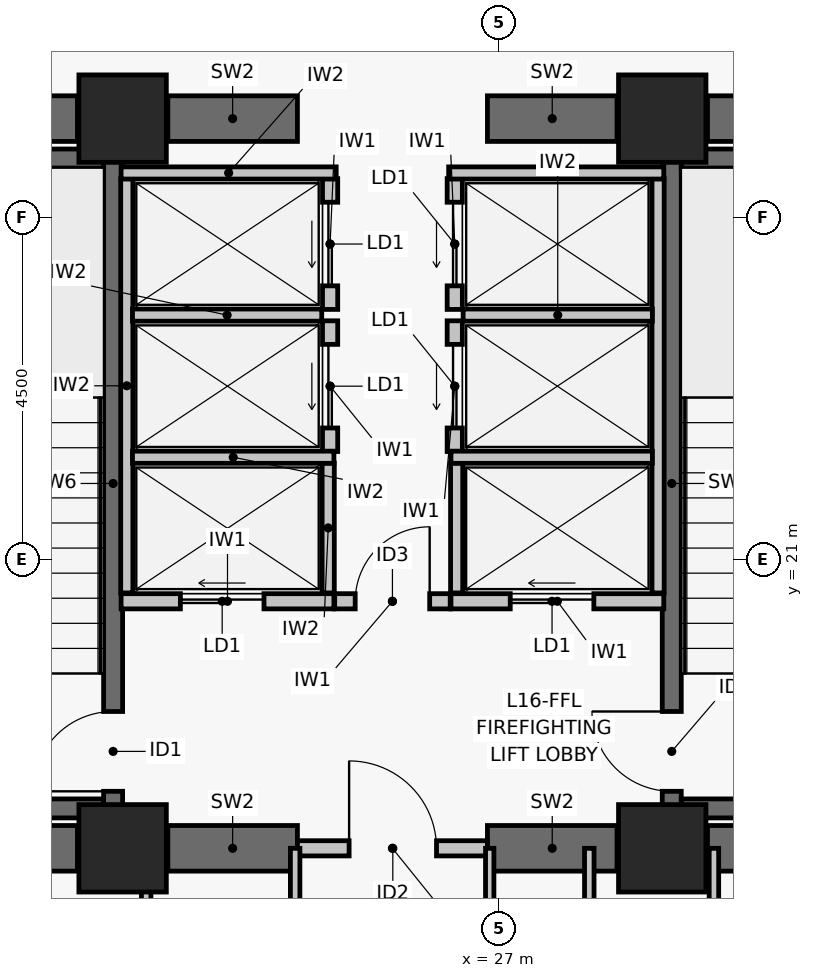
"""IFC4 building model, lengths in metres.
Left out: names, types, materials, properties, quantities, classifications, styles, units other than length and angle.
Written with IfcOpenShell. Run it as: python <this file> out.ifc"""

import sys

from ifc_helpers import new_model, si_unit, direction, frame, frame_2d, origin, origin_2d, place, context, subcontext, project, spatial, rectangle, extrude, element, fill, save


model = new_model("IFC4")
c1 = context("Model", 3, precision=1e-05, world=origin(), true_north=direction((0.0, 1.0)))
c2 = subcontext(c1, "Body", "Model", "MODEL_VIEW")
j1 = project(units=[si_unit("LENGTHUNIT", "METRE"), si_unit("PLANEANGLEUNIT", "RADIAN")], contexts=[c1])
p1 = place(None, origin())
s1 = spatial("IfcSite", under=j1, at=p1, CompositionType="ELEMENT")
p2 = place(p1, origin())
s2 = spatial("IfcBuilding", under=s1, at=p2, CompositionType="ELEMENT")
p3 = place(p2, frame((0.0, 0.0, 68.52)))
s3 = spatial("IfcBuildingStorey", under=s2, at=p3, CompositionType="ELEMENT", Elevation=68.52)
for number, where, z_axis, x_axis in (
    (1, (22.05, 17.2, 0.0), (0.0, 0.0, 1.0), (1.0, 0.0, 0.0)),
    (2, (29.15, 17.2, 0.0), (0.0, 0.0, 1.0), (1.0, 0.0, 0.0)),
    (3, (22.05, 26.8, 0.0), (0.0, 0.0, 1.0), (1.0, 0.0, 0.0)),
    (4, (29.15, 26.8, 0.0), (0.0, 0.0, 1.0), (1.0, 0.0, 0.0)),
):
    element("IfcColumn", number, at=place(p3, frame(where, z_axis=z_axis, x_axis=x_axis)), inside=s3, PredefinedType="COLUMN", context=c2, shape_type="SweptSolid", body=[
        extrude(rectangle(XDim=1.15, YDim=1.15, at=origin_2d()), origin(), (0.0, 0.0, 1.0), 3.72),
    ])
p4 = place(p3, frame((18.395, 17.2, 0.0), z_axis=(0.0, 0.0, 1.0), x_axis=(1.0, 0.0, 0.0)))
e5 = element("IfcWall", 5, at=p4, inside=s3, PredefinedType="SHEAR", context=c2, shape_type="SweptSolid", body=[
    extrude(rectangle(XDim=3.06, YDim=0.6, at=frame_2d((1.53, 0.0))), origin(), (0.0, 0.0, 1.0), 3.47),
])
p5 = place(p3, frame((22.645, 17.2, 0.0), z_axis=(0.0, 0.0, 1.0), x_axis=(1.0, 0.0, 0.0)))
e6 = element("IfcWall", 6, at=p5, inside=s3, PredefinedType="SHEAR", context=c2, shape_type="SweptSolid", body=[
    extrude(rectangle(XDim=1.705, YDim=0.6, at=frame_2d((0.853, 0.0))), origin(), (0.0, 0.0, 1.0), 3.47),
])
p6 = place(p3, frame((26.85, 17.2, 0.0), z_axis=(0.0, 0.0, 1.0), x_axis=(1.0, 0.0, 0.0)))
e7 = element("IfcWall", 7, at=p6, inside=s3, PredefinedType="SHEAR", context=c2, shape_type="SweptSolid", body=[
    extrude(rectangle(XDim=1.705, YDim=0.6, at=frame_2d((0.853, 0.0))), origin(), (0.0, 0.0, 1.0), 3.47),
])
p7 = place(p3, frame((29.745, 17.2, 0.0), z_axis=(0.0, 0.0, 1.0), x_axis=(1.0, 0.0, 0.0)))
e8 = element("IfcWall", 8, at=p7, inside=s3, PredefinedType="SHEAR", context=c2, shape_type="SweptSolid", body=[
    extrude(rectangle(XDim=3.06, YDim=0.6, at=frame_2d((1.53, 0.0))), origin(), (0.0, 0.0, 1.0), 3.47),
])
p8 = place(p3, frame((18.395, 26.8, 0.0), z_axis=(0.0, 0.0, 1.0), x_axis=(1.0, 0.0, 0.0)))
e9 = element("IfcWall", 9, at=p8, inside=s3, PredefinedType="SHEAR", context=c2, shape_type="SweptSolid", body=[
    extrude(rectangle(XDim=3.06, YDim=0.6, at=frame_2d((1.53, 0.0))), origin(), (0.0, 0.0, 1.0), 3.47),
])
p9 = place(p3, frame((22.645, 26.8, 0.0), z_axis=(0.0, 0.0, 1.0), x_axis=(1.0, 0.0, 0.0)))
e10 = element("IfcWall", 10, at=p9, inside=s3, PredefinedType="SHEAR", context=c2, shape_type="SweptSolid", body=[
    extrude(rectangle(XDim=1.705, YDim=0.6, at=frame_2d((0.853, 0.0))), origin(), (0.0, 0.0, 1.0), 3.47),
])
p10 = place(p3, frame((26.85, 26.8, 0.0), z_axis=(0.0, 0.0, 1.0), x_axis=(1.0, 0.0, 0.0)))
e11 = element("IfcWall", 11, at=p10, inside=s3, PredefinedType="SHEAR", context=c2, shape_type="SweptSolid", body=[
    extrude(rectangle(XDim=1.705, YDim=0.6, at=frame_2d((0.853, 0.0))), origin(), (0.0, 0.0, 1.0), 3.47),
])
p11 = place(p3, frame((29.745, 26.8, 0.0), z_axis=(0.0, 0.0, 1.0), x_axis=(1.0, 0.0, 0.0)))
e12 = element("IfcWall", 12, at=p11, inside=s3, PredefinedType="SHEAR", context=c2, shape_type="SweptSolid", body=[
    extrude(rectangle(XDim=3.06, YDim=0.6, at=frame_2d((1.53, 0.0))), origin(), (0.0, 0.0, 1.0), 3.47),
])
p12 = place(p3, frame((21.925, 17.6, 0.0), z_axis=(0.0, 0.0, 1.0), x_axis=(0.0, 1.0, 0.0)))
e13 = element("IfcWall", 13, at=p12, inside=s3, PredefinedType="SHEAR", context=c2, shape_type="SweptSolid", body=[
    extrude(rectangle(XDim=8.8, YDim=0.25, at=frame_2d((4.4, 0.0))), origin(), (0.0, 0.0, 1.0), 3.47),
])
p13 = place(p12, frame((0.35, 0.0, 0.0)))
e14 = element("IfcOpeningElement", 14, at=p13, cuts=e13, PredefinedType="OPENING", context=c2, shape_type="SweptSolid", body=[
    extrude(rectangle(XDim=1.05, YDim=2.08, at=frame_2d((0.525, 1.04))), frame((0.0, 0.135, 0.0), z_axis=(0.0, -1.0, 0.0), x_axis=(1.0, 0.0, 0.0)), (0.0, 0.0, 1.0), 0.27),
])
for number, where, z_axis, x_axis in (
    (15, (18.354, 17.725, 0.0), (0.0, 0.0, 1.0), (1.0, 0.0, 0.0)),
    (16, (18.354, 26.275, 0.0), (0.0, 0.0, 1.0), (1.0, 0.0, 0.0)),
):
    element("IfcWall", number, at=place(p3, frame(where, z_axis=z_axis, x_axis=x_axis)), inside=s3, PredefinedType="SHEAR", context=c2, shape_type="SweptSolid", body=[
        extrude(rectangle(XDim=3.446, YDim=0.25, at=frame_2d((1.723, 0.0))), origin(), (0.0, 0.0, 1.0), 3.47),
    ])
p14 = place(p3, frame((29.275, 17.6, 0.0), z_axis=(0.0, 0.0, 1.0), x_axis=(0.0, 1.0, 0.0)))
e17 = element("IfcWall", 17, at=p14, inside=s3, PredefinedType="SHEAR", context=c2, shape_type="SweptSolid", body=[
    extrude(rectangle(XDim=8.8, YDim=0.25, at=frame_2d((4.4, 0.0))), origin(), (0.0, 0.0, 1.0), 3.47),
])
p15 = place(p14, frame((0.35, 0.0, 0.0)))
e18 = element("IfcOpeningElement", 18, at=p15, cuts=e17, PredefinedType="OPENING", context=c2, shape_type="SweptSolid", body=[
    extrude(rectangle(XDim=1.05, YDim=2.08, at=frame_2d((0.525, 1.04))), frame((0.0, 0.135, 0.0), z_axis=(0.0, -1.0, 0.0), x_axis=(1.0, 0.0, 0.0)), (0.0, 0.0, 1.0), 0.27),
])
for number, where, z_axis, x_axis in (
    (19, (29.4, 17.725, 0.0), (0.0, 0.0, 1.0), (1.0, 0.0, 0.0)),
    (20, (29.4, 26.275, 0.0), (0.0, 0.0, 1.0), (1.0, 0.0, 0.0)),
):
    element("IfcWall", number, at=place(p3, frame(where, z_axis=z_axis, x_axis=x_axis)), inside=s3, PredefinedType="SHEAR", context=c2, shape_type="SweptSolid", body=[
        extrude(rectangle(XDim=3.446, YDim=0.25, at=frame_2d((1.723, 0.0))), origin(), (0.0, 0.0, 1.0), 3.47),
    ])
p16 = place(p3, frame((24.35, 17.2, 0.0), z_axis=(0.0, 0.0, 1.0), x_axis=(1.0, 0.0, 0.0)))
e21 = element("IfcWall", 21, at=p16, inside=s3, PredefinedType="PARTITIONING", context=c2, shape_type="SweptSolid", body=[
    extrude(rectangle(XDim=2.5, YDim=0.2, at=frame_2d((1.25, 0.0))), origin(), (0.0, 0.0, 1.0), 2.6),
])
p17 = place(p16, frame((0.68, 0.0, 0.0)))
e22 = element("IfcOpeningElement", 22, at=p17, cuts=e21, PredefinedType="OPENING", context=c2, shape_type="SweptSolid", body=[
    extrude(rectangle(XDim=1.15, YDim=2.08, at=frame_2d((0.575, 1.04))), frame((0.0, 0.11, 0.0), z_axis=(0.0, -1.0, 0.0), x_axis=(1.0, 0.0, 0.0)), (0.0, 0.0, 1.0), 0.22),
])
p18 = place(p3, frame((24.84, 20.45, 0.0), z_axis=(0.0, 0.0, 1.0), x_axis=(1.0, 0.0, 0.0)))
e23 = element("IfcWall", 23, at=p18, inside=s3, PredefinedType="PARTITIONING", context=c2, shape_type="SweptSolid", body=[
    extrude(rectangle(XDim=1.52, YDim=0.2, at=frame_2d((0.76, 0.0))), origin(), (0.0, 0.0, 1.0), 3.47),
])
p19 = place(p18, frame((0.27, 0.0, 0.0)))
e24 = element("IfcOpeningElement", 24, at=p19, cuts=e23, PredefinedType="OPENING", context=c2, shape_type="SweptSolid", body=[
    extrude(rectangle(XDim=0.98, YDim=2.06, at=frame_2d((0.49, 1.03))), frame((0.0, 0.11, 0.0), z_axis=(0.0, -1.0, 0.0), x_axis=(1.0, 0.0, 0.0)), (0.0, 0.0, 1.0), 0.22),
])
p20 = place(p3, frame((22.03, 20.45, 0.0), z_axis=(0.0, 0.0, 1.0), x_axis=(1.0, 0.0, 0.0)))
e25 = element("IfcWall", 25, at=p20, inside=s3, PredefinedType="PARTITIONING", context=c2, shape_type="SweptSolid", body=[
    extrude(rectangle(XDim=2.8, YDim=0.2, at=frame_2d((1.4, 0.0))), origin(), (0.0, 0.0, 1.0), 3.47),
])
p21 = place(p20, frame((0.78, 0.0, 0.0)))
e26 = element("IfcOpeningElement", 26, at=p21, cuts=e25, PredefinedType="OPENING", context=c2, shape_type="SweptSolid", body=[
    extrude(rectangle(XDim=1.1, YDim=2.08, at=frame_2d((0.55, 1.04))), frame((0.0, 0.11, 0.0), z_axis=(0.0, -1.0, 0.0), x_axis=(1.0, 0.0, 0.0)), (0.0, 0.0, 1.0), 0.22),
])
p22 = place(p3, frame((26.37, 20.45, 0.0), z_axis=(0.0, 0.0, 1.0), x_axis=(1.0, 0.0, 0.0)))
e27 = element("IfcWall", 27, at=p22, inside=s3, PredefinedType="PARTITIONING", context=c2, shape_type="SweptSolid", body=[
    extrude(rectangle(XDim=2.8, YDim=0.2, at=frame_2d((1.4, 0.0))), origin(), (0.0, 0.0, 1.0), 3.47),
])
p23 = place(p22, frame((0.78, 0.0, 0.0)))
e28 = element("IfcOpeningElement", 28, at=p23, cuts=e27, PredefinedType="OPENING", context=c2, shape_type="SweptSolid", body=[
    extrude(rectangle(XDim=1.1, YDim=2.08, at=frame_2d((0.55, 1.04))), frame((0.0, 0.11, 0.0), z_axis=(0.0, -1.0, 0.0), x_axis=(1.0, 0.0, 0.0)), (0.0, 0.0, 1.0), 0.22),
])
p24 = place(p3, frame((24.78, 22.42, 0.0), z_axis=(0.0, 0.0, 1.0), x_axis=(0.0, 1.0, 0.0)))
e29 = element("IfcWall", 29, at=p24, inside=s3, PredefinedType="PARTITIONING", context=c2, shape_type="SweptSolid", body=[
    extrude(rectangle(XDim=1.72, YDim=0.2, at=frame_2d((0.86, 0.0))), origin(), (0.0, 0.0, 1.0), 3.47),
])
p25 = place(p24, frame((0.31, 0.0, 0.0)))
e30 = element("IfcOpeningElement", 30, at=p25, cuts=e29, PredefinedType="OPENING", context=c2, shape_type="SweptSolid", body=[
    extrude(rectangle(XDim=1.1, YDim=2.08, at=frame_2d((0.55, 1.04))), frame((0.0, 0.11, 0.0), z_axis=(0.0, -1.0, 0.0), x_axis=(1.0, 0.0, 0.0)), (0.0, 0.0, 1.0), 0.22),
])
p26 = place(p3, frame((24.78, 24.29, 0.0), z_axis=(0.0, 0.0, 1.0), x_axis=(0.0, 1.0, 0.0)))
e31 = element("IfcWall", 31, at=p26, inside=s3, PredefinedType="PARTITIONING", context=c2, shape_type="SweptSolid", body=[
    extrude(rectangle(XDim=1.72, YDim=0.2, at=frame_2d((0.86, 0.0))), origin(), (0.0, 0.0, 1.0), 3.47),
])
p27 = place(p26, frame((0.31, 0.0, 0.0)))
e32 = element("IfcOpeningElement", 32, at=p27, cuts=e31, PredefinedType="OPENING", context=c2, shape_type="SweptSolid", body=[
    extrude(rectangle(XDim=1.1, YDim=2.08, at=frame_2d((0.55, 1.04))), frame((0.0, 0.11, 0.0), z_axis=(0.0, -1.0, 0.0), x_axis=(1.0, 0.0, 0.0)), (0.0, 0.0, 1.0), 0.22),
])
p28 = place(p3, frame((26.42, 22.42, 0.0), z_axis=(0.0, 0.0, 1.0), x_axis=(0.0, 1.0, 0.0)))
e33 = element("IfcWall", 33, at=p28, inside=s3, PredefinedType="PARTITIONING", context=c2, shape_type="SweptSolid", body=[
    extrude(rectangle(XDim=1.72, YDim=0.2, at=frame_2d((0.86, 0.0))), origin(), (0.0, 0.0, 1.0), 3.47),
])
p29 = place(p28, frame((0.31, 0.0, 0.0)))
e34 = element("IfcOpeningElement", 34, at=p29, cuts=e33, PredefinedType="OPENING", context=c2, shape_type="SweptSolid", body=[
    extrude(rectangle(XDim=1.1, YDim=2.08, at=frame_2d((0.55, 1.04))), frame((0.0, 0.11, 0.0), z_axis=(0.0, -1.0, 0.0), x_axis=(1.0, 0.0, 0.0)), (0.0, 0.0, 1.0), 0.22),
])
p30 = place(p3, frame((26.42, 24.29, 0.0), z_axis=(0.0, 0.0, 1.0), x_axis=(0.0, 1.0, 0.0)))
e35 = element("IfcWall", 35, at=p30, inside=s3, PredefinedType="PARTITIONING", context=c2, shape_type="SweptSolid", body=[
    extrude(rectangle(XDim=1.72, YDim=0.2, at=frame_2d((0.86, 0.0))), origin(), (0.0, 0.0, 1.0), 3.47),
])
p31 = place(p30, frame((0.31, 0.0, 0.0)))
e36 = element("IfcOpeningElement", 36, at=p31, cuts=e35, PredefinedType="OPENING", context=c2, shape_type="SweptSolid", body=[
    extrude(rectangle(XDim=1.1, YDim=2.08, at=frame_2d((0.55, 1.04))), frame((0.0, 0.11, 0.0), z_axis=(0.0, -1.0, 0.0), x_axis=(1.0, 0.0, 0.0)), (0.0, 0.0, 1.0), 0.22),
])
p32 = place(p3, frame((22.105, 20.56, 0.0), z_axis=(0.0, 0.0, 1.0), x_axis=(0.0, 1.0, 0.0)))
e37 = element("IfcWall", 37, at=p32, inside=s3, PredefinedType="PARTITIONING", context=c2, shape_type="SweptSolid", body=[
    extrude(rectangle(XDim=5.45, YDim=0.16, at=frame_2d((2.725, 0.0))), origin(), (0.0, 0.0, 1.0), 3.47),
])
p33 = place(p3, frame((24.755, 20.56, 0.0), z_axis=(0.0, 0.0, 1.0), x_axis=(0.0, 1.0, 0.0)))
e38 = element("IfcWall", 38, at=p33, inside=s3, PredefinedType="PARTITIONING", context=c2, shape_type="SweptSolid", body=[
    extrude(rectangle(XDim=1.71, YDim=0.16, at=frame_2d((0.855, 0.0))), origin(), (0.0, 0.0, 1.0), 3.47),
])
p34 = place(p3, frame((22.18, 22.345, 0.0), z_axis=(0.0, 0.0, 1.0), x_axis=(1.0, 0.0, 0.0)))
e39 = element("IfcWall", 39, at=p34, inside=s3, PredefinedType="PARTITIONING", context=c2, shape_type="SweptSolid", body=[
    extrude(rectangle(XDim=2.65, YDim=0.16, at=frame_2d((1.325, 0.0))), origin(), (0.0, 0.0, 1.0), 3.47),
])
p35 = place(p3, frame((22.18, 24.215, 0.0), z_axis=(0.0, 0.0, 1.0), x_axis=(1.0, 0.0, 0.0)))
e40 = element("IfcWall", 40, at=p35, inside=s3, PredefinedType="PARTITIONING", context=c2, shape_type="SweptSolid", body=[
    extrude(rectangle(XDim=2.49, YDim=0.16, at=frame_2d((1.245, 0.0))), origin(), (0.0, 0.0, 1.0), 3.47),
])
p36 = place(p3, frame((22.03, 26.085, 0.0), z_axis=(0.0, 0.0, 1.0), x_axis=(1.0, 0.0, 0.0)))
e41 = element("IfcWall", 41, at=p36, inside=s3, PredefinedType="PARTITIONING", context=c2, shape_type="SweptSolid", body=[
    extrude(rectangle(XDim=2.83, YDim=0.16, at=frame_2d((1.415, 0.0))), origin(), (0.0, 0.0, 1.0), 3.47),
])
p37 = place(p3, frame((29.095, 20.56, 0.0), z_axis=(0.0, 0.0, 1.0), x_axis=(0.0, 1.0, 0.0)))
e42 = element("IfcWall", 42, at=p37, inside=s3, PredefinedType="PARTITIONING", context=c2, shape_type="SweptSolid", body=[
    extrude(rectangle(XDim=5.45, YDim=0.16, at=frame_2d((2.725, 0.0))), origin(), (0.0, 0.0, 1.0), 3.47),
])
p38 = place(p3, frame((26.445, 20.56, 0.0), z_axis=(0.0, 0.0, 1.0), x_axis=(0.0, 1.0, 0.0)))
e43 = element("IfcWall", 43, at=p38, inside=s3, PredefinedType="PARTITIONING", context=c2, shape_type="SweptSolid", body=[
    extrude(rectangle(XDim=1.71, YDim=0.16, at=frame_2d((0.855, 0.0))), origin(), (0.0, 0.0, 1.0), 3.47),
])
p39 = place(p3, frame((26.37, 22.345, 0.0), z_axis=(0.0, 0.0, 1.0), x_axis=(1.0, 0.0, 0.0)))
e44 = element("IfcWall", 44, at=p39, inside=s3, PredefinedType="PARTITIONING", context=c2, shape_type="SweptSolid", body=[
    extrude(rectangle(XDim=2.65, YDim=0.16, at=frame_2d((1.325, 0.0))), origin(), (0.0, 0.0, 1.0), 3.47),
])
p40 = place(p3, frame((26.53, 24.215, 0.0), z_axis=(0.0, 0.0, 1.0), x_axis=(1.0, 0.0, 0.0)))
e45 = element("IfcWall", 45, at=p40, inside=s3, PredefinedType="PARTITIONING", context=c2, shape_type="SweptSolid", body=[
    extrude(rectangle(XDim=2.49, YDim=0.16, at=frame_2d((1.245, 0.0))), origin(), (0.0, 0.0, 1.0), 3.47),
])
p41 = place(p3, frame((26.34, 26.085, 0.0), z_axis=(0.0, 0.0, 1.0), x_axis=(1.0, 0.0, 0.0)))
e46 = element("IfcWall", 46, at=p41, inside=s3, PredefinedType="PARTITIONING", context=c2, shape_type="SweptSolid", body=[
    extrude(rectangle(XDim=2.83, YDim=0.16, at=frame_2d((1.415, 0.0))), origin(), (0.0, 0.0, 1.0), 3.47),
])
p42 = place(p3, frame((22.36, 14.95, 0.0), z_axis=(0.0, 0.0, 1.0), x_axis=(0.0, 1.0, 0.0)))
e47 = element("IfcWall", 47, at=p42, inside=s3, PredefinedType="PARTITIONING", context=c2, shape_type="SweptSolid", body=[
    extrude(rectangle(XDim=2.25, YDim=0.125, at=frame_2d((1.125, 0.0))), origin(), (0.0, 0.0, 1.0), 2.2),
])
p43 = place(p3, frame((24.32, 14.95, 0.0), z_axis=(0.0, 0.0, 1.0), x_axis=(0.0, 1.0, 0.0)))
e48 = element("IfcWall", 48, at=p43, inside=s3, PredefinedType="PARTITIONING", context=c2, shape_type="SweptSolid", body=[
    extrude(rectangle(XDim=2.25, YDim=0.125, at=frame_2d((1.125, 0.0))), origin(), (0.0, 0.0, 1.0), 2.6),
])
p44 = place(p3, frame((26.88, 14.95, 0.0), z_axis=(0.0, 0.0, 1.0), x_axis=(0.0, 1.0, 0.0)))
e49 = element("IfcWall", 49, at=p44, inside=s3, PredefinedType="PARTITIONING", context=c2, shape_type="SweptSolid", body=[
    extrude(rectangle(XDim=2.25, YDim=0.11, at=frame_2d((1.125, 0.0))), origin(), (0.0, 0.0, 1.0), 2.6),
])
for number, where, z_axis, x_axis in (
    (50, (28.19, 14.95, 0.0), (0.0, 0.0, 1.0), (0.0, 1.0, 0.0)),
    (51, (29.83, 14.95, 0.0), (0.0, 0.0, 1.0), (0.0, 1.0, 0.0)),
):
    element("IfcWall", number, at=place(p3, frame(where, z_axis=z_axis, x_axis=x_axis)), inside=s3, PredefinedType="PARTITIONING", context=c2, shape_type="SweptSolid", body=[
        extrude(rectangle(XDim=2.25, YDim=0.125, at=frame_2d((1.125, 0.0))), origin(), (0.0, 0.0, 1.0), 2.6),
    ])
p45 = place(p13, origin())
e52 = element("IfcDoor", 52, at=p45, inside=s3, OperationType="SINGLE_SWING_LEFT", PredefinedType="DOOR", context=c2, shape_type="SweptSolid", body=[
    extrude(rectangle(XDim=1.05, YDim=2.08, at=frame_2d((0.525, 1.04))), frame((0.0, 0.025, 0.0), z_axis=(0.0, -1.0, 0.0), x_axis=(1.0, 0.0, 0.0)), (0.0, 0.0, 1.0), 0.05),
])
fill(e14, e52)
p46 = place(p15, origin())
e53 = element("IfcDoor", 53, at=p46, inside=s3, OperationType="SINGLE_SWING_RIGHT", PredefinedType="DOOR", context=c2, shape_type="SweptSolid", body=[
    extrude(rectangle(XDim=1.05, YDim=2.08, at=frame_2d((0.525, 1.04))), frame((0.0, 0.025, 0.0), z_axis=(0.0, -1.0, 0.0), x_axis=(1.0, 0.0, 0.0)), (0.0, 0.0, 1.0), 0.05),
])
fill(e18, e53)
p47 = place(p17, origin())
e54 = element("IfcDoor", 54, at=p47, inside=s3, OperationType="SINGLE_SWING_LEFT", PredefinedType="DOOR", context=c2, shape_type="SweptSolid", body=[
    extrude(rectangle(XDim=1.15, YDim=2.08, at=frame_2d((0.575, 1.04))), frame((0.0, 0.025, 0.0), z_axis=(0.0, -1.0, 0.0), x_axis=(1.0, 0.0, 0.0)), (0.0, 0.0, 1.0), 0.05),
])
fill(e22, e54)
p48 = place(p19, origin())
e55 = element("IfcDoor", 55, at=p48, inside=s3, OperationType="SINGLE_SWING_RIGHT", PredefinedType="DOOR", context=c2, shape_type="SweptSolid", body=[
    extrude(rectangle(XDim=0.98, YDim=2.06, at=frame_2d((0.49, 1.03))), frame((0.0, 0.025, 0.0), z_axis=(0.0, -1.0, 0.0), x_axis=(1.0, 0.0, 0.0)), (0.0, 0.0, 1.0), 0.05),
])
fill(e24, e55)
p49 = place(p21, origin())
e56 = element("IfcDoor", 56, at=p49, inside=s3, OperationType="DOUBLE_DOOR_SLIDING", PredefinedType="DOOR", context=c2, shape_type="SweptSolid", body=[
    extrude(rectangle(XDim=1.1, YDim=2.08, at=frame_2d((0.55, 1.04))), frame((0.0, 0.025, 0.0), z_axis=(0.0, -1.0, 0.0), x_axis=(1.0, 0.0, 0.0)), (0.0, 0.0, 1.0), 0.05),
])
fill(e26, e56)
p50 = place(p23, origin())
e57 = element("IfcDoor", 57, at=p50, inside=s3, OperationType="DOUBLE_DOOR_SLIDING", PredefinedType="DOOR", context=c2, shape_type="SweptSolid", body=[
    extrude(rectangle(XDim=1.1, YDim=2.08, at=frame_2d((0.55, 1.04))), frame((0.0, 0.025, 0.0), z_axis=(0.0, -1.0, 0.0), x_axis=(1.0, 0.0, 0.0)), (0.0, 0.0, 1.0), 0.05),
])
fill(e28, e57)
p51 = place(p25, origin())
e58 = element("IfcDoor", 58, at=p51, inside=s3, OperationType="DOUBLE_DOOR_SLIDING", PredefinedType="DOOR", context=c2, shape_type="SweptSolid", body=[
    extrude(rectangle(XDim=1.1, YDim=2.08, at=frame_2d((0.55, 1.04))), frame((0.0, 0.025, 0.0), z_axis=(0.0, -1.0, 0.0), x_axis=(1.0, 0.0, 0.0)), (0.0, 0.0, 1.0), 0.05),
])
fill(e30, e58)
p52 = place(p27, origin())
e59 = element("IfcDoor", 59, at=p52, inside=s3, OperationType="DOUBLE_DOOR_SLIDING", PredefinedType="DOOR", context=c2, shape_type="SweptSolid", body=[
    extrude(rectangle(XDim=1.1, YDim=2.08, at=frame_2d((0.55, 1.04))), frame((0.0, 0.025, 0.0), z_axis=(0.0, -1.0, 0.0), x_axis=(1.0, 0.0, 0.0)), (0.0, 0.0, 1.0), 0.05),
])
fill(e32, e59)
p53 = place(p29, origin())
e60 = element("IfcDoor", 60, at=p53, inside=s3, OperationType="DOUBLE_DOOR_SLIDING", PredefinedType="DOOR", context=c2, shape_type="SweptSolid", body=[
    extrude(rectangle(XDim=1.1, YDim=2.08, at=frame_2d((0.55, 1.04))), frame((0.0, 0.025, 0.0), z_axis=(0.0, -1.0, 0.0), x_axis=(1.0, 0.0, 0.0)), (0.0, 0.0, 1.0), 0.05),
])
fill(e34, e60)
p54 = place(p31, origin())
e61 = element("IfcDoor", 61, at=p54, inside=s3, OperationType="DOUBLE_DOOR_SLIDING", PredefinedType="DOOR", context=c2, shape_type="SweptSolid", body=[
    extrude(rectangle(XDim=1.1, YDim=2.08, at=frame_2d((0.55, 1.04))), frame((0.0, 0.025, 0.0), z_axis=(0.0, -1.0, 0.0), x_axis=(1.0, 0.0, 0.0)), (0.0, 0.0, 1.0), 0.05),
])
fill(e36, e61)
save(model, sys.argv[1])
